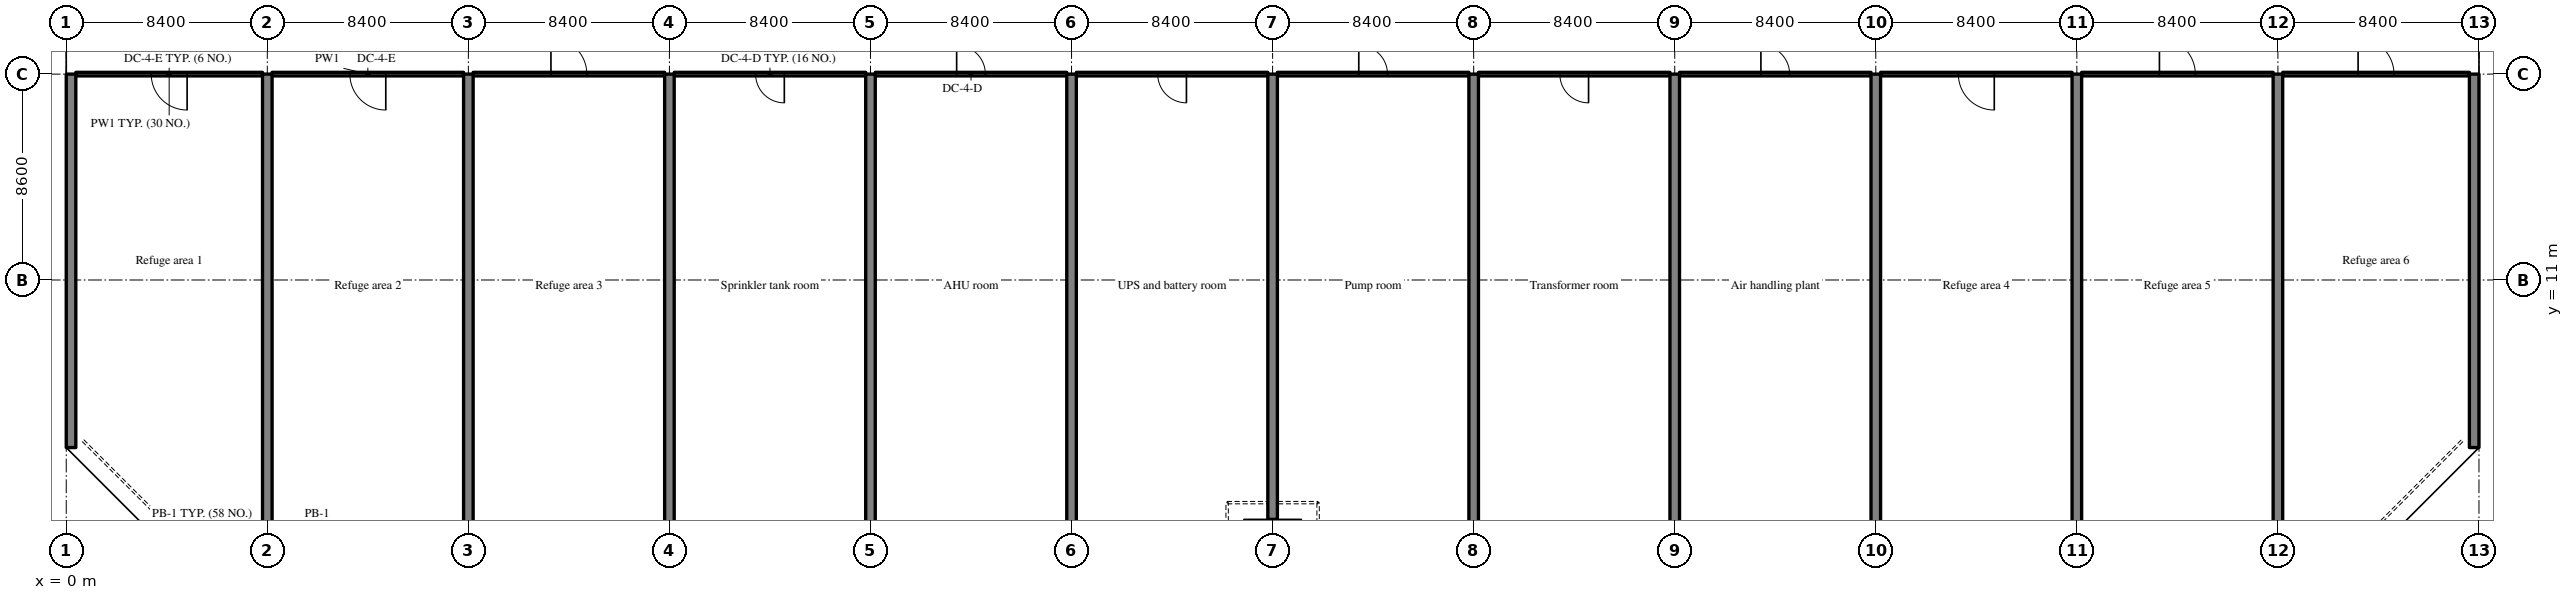
"""IFC4 building model, lengths in metres.
Left out: names, types, materials, properties, quantities, classifications, styles, units other than length and angle.
Written with IfcOpenShell. Run it as: python <this file> out.ifc"""

import sys

from ifc_helpers import new_model, si_unit, direction, frame, frame_2d, origin, place, context, subcontext, project, spatial, rectangle, extrude, source, transform, mapped, element, fill, save


model = new_model("IFC4")
c1 = context("Model", 3, precision=1e-05, world=origin(), true_north=direction((0.0, 1.0)))
c2 = subcontext(c1, "Body", "Model", "MODEL_VIEW")
j1 = project(units=[si_unit("LENGTHUNIT", "METRE"), si_unit("PLANEANGLEUNIT", "RADIAN")], contexts=[c1])
p1 = place(None, origin())
s1 = spatial("IfcSite", under=j1, at=p1, CompositionType="ELEMENT")
p2 = place(p1, origin())
s2 = spatial("IfcBuilding", under=s1, at=p2, CompositionType="ELEMENT")
p3 = place(p2, frame((0.0, 0.0, 81.0)))
s3 = spatial("IfcBuildingStorey", under=s2, at=p3, CompositionType="ELEMENT", Elevation=81.0)
m1 = source(origin(), c2, "Body", "SweptSolid", [
    extrude(rectangle(XDim=15.6, YDim=0.4, at=frame_2d((7.8, 0.0))), origin(), (0.0, 0.0, 1.0), 5.12),
])
p4 = place(p3, frame((0.2, 4.0, 0.0), z_axis=(0.0, 0.0, 1.0), x_axis=(0.0, 1.0, 0.0)))
e1 = element("IfcWall", 1, at=p4, inside=s3, PredefinedType="SHEAR", context=c2, shape_type="MappedRepresentation", body=[
    mapped(m1, transform((0.0, 0.0, 0.0), scale=1.0)),
])
m2 = source(origin(), c2, "Body", "SweptSolid", [
    extrude(rectangle(XDim=19.6, YDim=0.4, at=frame_2d((9.8, 0.0))), origin(), (0.0, 0.0, 1.0), 5.12),
])
for number, where, z_axis, x_axis in (
    (2, (8.4, 0.0, 0.0), (0.0, 0.0, 1.0), (0.0, 1.0, 0.0)),
    (3, (16.8, 0.0, 0.0), (0.0, 0.0, 1.0), (0.0, 1.0, 0.0)),
    (4, (25.2, 0.0, 0.0), (0.0, 0.0, 1.0), (0.0, 1.0, 0.0)),
    (5, (33.6, 0.0, 0.0), (0.0, 0.0, 1.0), (0.0, 1.0, 0.0)),
    (6, (42.0, 0.0, 0.0), (0.0, 0.0, 1.0), (0.0, 1.0, 0.0)),
):
    element("IfcWall", number, at=place(p3, frame(where, z_axis=z_axis, x_axis=x_axis)), inside=s3, PredefinedType="SHEAR", context=c2, shape_type="MappedRepresentation", body=[
        mapped(m2, transform((0.0, 0.0, 0.0), scale=1.0)),
    ])
m3 = source(origin(), c2, "Body", "SweptSolid", [
    extrude(rectangle(XDim=18.6, YDim=0.4, at=frame_2d((9.3, 0.0))), origin(), (0.0, 0.0, 1.0), 5.12),
])
p5 = place(p3, frame((50.4, 1.0, 0.0), z_axis=(0.0, 0.0, 1.0), x_axis=(0.0, 1.0, 0.0)))
e7 = element("IfcWall", 7, at=p5, inside=s3, PredefinedType="SHEAR", context=c2, shape_type="MappedRepresentation", body=[
    mapped(m3, transform((0.0, 0.0, 0.0), scale=1.0)),
])
for number, where, z_axis, x_axis in (
    (8, (58.8, 0.0, 0.0), (0.0, 0.0, 1.0), (0.0, 1.0, 0.0)),
    (9, (67.2, 0.0, 0.0), (0.0, 0.0, 1.0), (0.0, 1.0, 0.0)),
    (10, (75.6, 0.0, 0.0), (0.0, 0.0, 1.0), (0.0, 1.0, 0.0)),
    (11, (84.0, 0.0, 0.0), (0.0, 0.0, 1.0), (0.0, 1.0, 0.0)),
    (12, (92.4, 0.0, 0.0), (0.0, 0.0, 1.0), (0.0, 1.0, 0.0)),
):
    element("IfcWall", number, at=place(p3, frame(where, z_axis=z_axis, x_axis=x_axis)), inside=s3, PredefinedType="SHEAR", context=c2, shape_type="MappedRepresentation", body=[
        mapped(m2, transform((0.0, 0.0, 0.0), scale=1.0)),
    ])
p6 = place(p3, frame((100.6, 4.0, 0.0), z_axis=(0.0, 0.0, 1.0), x_axis=(0.0, 1.0, 0.0)))
e13 = element("IfcWall", 13, at=p6, inside=s3, PredefinedType="SHEAR", context=c2, shape_type="MappedRepresentation", body=[
    mapped(m1, transform((0.0, 0.0, 0.0), scale=1.0)),
])
m4 = source(origin(), c2, "Body", "SweptSolid", [
    extrude(rectangle(XDim=7.8, YDim=0.15, at=frame_2d((3.9, 0.0))), origin(), (0.0, 0.0, 1.0), 4.37),
])
p7 = place(p3, frame((0.4, 19.6, 0.0), z_axis=(0.0, 0.0, 1.0), x_axis=(1.0, 0.0, 0.0)))
e14 = element("IfcWall", 14, at=p7, inside=s3, PredefinedType="PARTITIONING", context=c2, shape_type="MappedRepresentation", body=[
    mapped(m4, transform((0.0, 0.0, 0.0), scale=1.0)),
])
m5 = source(origin(), c2, "Body", "SweptSolid", [
    extrude(rectangle(XDim=1.5, YDim=2.1, at=frame_2d((0.75, 1.05))), frame((0.0, 0.085, 0.0), z_axis=(0.0, -1.0, 0.0), x_axis=(1.0, 0.0, 0.0)), (0.0, 0.0, 1.0), 0.17),
])
p8 = place(p7, frame((3.15, 0.0, 0.0)))
e15 = element("IfcOpeningElement", 15, at=p8, cuts=e14, PredefinedType="OPENING", context=c2, shape_type="MappedRepresentation", body=[
    mapped(m5, transform((0.0, 0.0, 0.0), scale=1.0)),
])
m6 = source(origin(), c2, "Body", "SweptSolid", [
    extrude(rectangle(XDim=8.0, YDim=0.15, at=frame_2d((4.0, 0.0))), origin(), (0.0, 0.0, 1.0), 4.37),
])
p9 = place(p3, frame((8.6, 19.6, 0.0), z_axis=(0.0, 0.0, 1.0), x_axis=(1.0, 0.0, 0.0)))
e16 = element("IfcWall", 16, at=p9, inside=s3, PredefinedType="PARTITIONING", context=c2, shape_type="MappedRepresentation", body=[
    mapped(m6, transform((0.0, 0.0, 0.0), scale=1.0)),
])
p10 = place(p9, frame((3.25, 0.0, 0.0)))
e17 = element("IfcOpeningElement", 17, at=p10, cuts=e16, PredefinedType="OPENING", context=c2, shape_type="MappedRepresentation", body=[
    mapped(m5, transform((0.0, 0.0, 0.0), scale=1.0)),
])
p11 = place(p3, frame((17.0, 19.6, 0.0), z_axis=(0.0, 0.0, 1.0), x_axis=(1.0, 0.0, 0.0)))
e18 = element("IfcWall", 18, at=p11, inside=s3, PredefinedType="PARTITIONING", context=c2, shape_type="MappedRepresentation", body=[
    mapped(m6, transform((0.0, 0.0, 0.0), scale=1.0)),
])
p12 = place(p11, frame((3.25, 0.0, 0.0)))
e19 = element("IfcOpeningElement", 19, at=p12, cuts=e18, PredefinedType="OPENING", context=c2, shape_type="MappedRepresentation", body=[
    mapped(m5, transform((0.0, 0.0, 0.0), scale=1.0)),
])
p13 = place(p3, frame((25.4, 19.6, 0.0), z_axis=(0.0, 0.0, 1.0), x_axis=(1.0, 0.0, 0.0)))
e20 = element("IfcWall", 20, at=p13, inside=s3, PredefinedType="PARTITIONING", context=c2, shape_type="MappedRepresentation", body=[
    mapped(m6, transform((0.0, 0.0, 0.0), scale=1.0)),
])
m7 = source(origin(), c2, "Body", "SweptSolid", [
    extrude(rectangle(XDim=1.2, YDim=2.1, at=frame_2d((0.6, 1.05))), frame((0.0, 0.085, 0.0), z_axis=(0.0, -1.0, 0.0), x_axis=(1.0, 0.0, 0.0)), (0.0, 0.0, 1.0), 0.17),
])
p14 = place(p13, frame((3.4, 0.0, 0.0)))
e21 = element("IfcOpeningElement", 21, at=p14, cuts=e20, PredefinedType="OPENING", context=c2, shape_type="MappedRepresentation", body=[
    mapped(m7, transform((0.0, 0.0, 0.0), scale=1.0)),
])
p15 = place(p3, frame((33.8, 19.6, 0.0), z_axis=(0.0, 0.0, 1.0), x_axis=(1.0, 0.0, 0.0)))
e22 = element("IfcWall", 22, at=p15, inside=s3, PredefinedType="PARTITIONING", context=c2, shape_type="MappedRepresentation", body=[
    mapped(m6, transform((0.0, 0.0, 0.0), scale=1.0)),
])
p16 = place(p15, frame((3.4, 0.0, 0.0)))
e23 = element("IfcOpeningElement", 23, at=p16, cuts=e22, PredefinedType="OPENING", context=c2, shape_type="MappedRepresentation", body=[
    mapped(m7, transform((0.0, 0.0, 0.0), scale=1.0)),
])
p17 = place(p3, frame((42.2, 19.6, 0.0), z_axis=(0.0, 0.0, 1.0), x_axis=(1.0, 0.0, 0.0)))
e24 = element("IfcWall", 24, at=p17, inside=s3, PredefinedType="PARTITIONING", context=c2, shape_type="MappedRepresentation", body=[
    mapped(m6, transform((0.0, 0.0, 0.0), scale=1.0)),
])
p18 = place(p17, frame((3.4, 0.0, 0.0)))
e25 = element("IfcOpeningElement", 25, at=p18, cuts=e24, PredefinedType="OPENING", context=c2, shape_type="MappedRepresentation", body=[
    mapped(m7, transform((0.0, 0.0, 0.0), scale=1.0)),
])
p19 = place(p3, frame((50.6, 19.6, 0.0), z_axis=(0.0, 0.0, 1.0), x_axis=(1.0, 0.0, 0.0)))
e26 = element("IfcWall", 26, at=p19, inside=s3, PredefinedType="PARTITIONING", context=c2, shape_type="MappedRepresentation", body=[
    mapped(m6, transform((0.0, 0.0, 0.0), scale=1.0)),
])
p20 = place(p19, frame((3.4, 0.0, 0.0)))
e27 = element("IfcOpeningElement", 27, at=p20, cuts=e26, PredefinedType="OPENING", context=c2, shape_type="MappedRepresentation", body=[
    mapped(m7, transform((0.0, 0.0, 0.0), scale=1.0)),
])
p21 = place(p3, frame((59.0, 19.6, 0.0), z_axis=(0.0, 0.0, 1.0), x_axis=(1.0, 0.0, 0.0)))
e28 = element("IfcWall", 28, at=p21, inside=s3, PredefinedType="PARTITIONING", context=c2, shape_type="MappedRepresentation", body=[
    mapped(m6, transform((0.0, 0.0, 0.0), scale=1.0)),
])
p22 = place(p21, frame((3.4, 0.0, 0.0)))
e29 = element("IfcOpeningElement", 29, at=p22, cuts=e28, PredefinedType="OPENING", context=c2, shape_type="MappedRepresentation", body=[
    mapped(m7, transform((0.0, 0.0, 0.0), scale=1.0)),
])
p23 = place(p3, frame((67.4, 19.6, 0.0), z_axis=(0.0, 0.0, 1.0), x_axis=(1.0, 0.0, 0.0)))
e30 = element("IfcWall", 30, at=p23, inside=s3, PredefinedType="PARTITIONING", context=c2, shape_type="MappedRepresentation", body=[
    mapped(m6, transform((0.0, 0.0, 0.0), scale=1.0)),
])
p24 = place(p23, frame((3.4, 0.0, 0.0)))
e31 = element("IfcOpeningElement", 31, at=p24, cuts=e30, PredefinedType="OPENING", context=c2, shape_type="MappedRepresentation", body=[
    mapped(m7, transform((0.0, 0.0, 0.0), scale=1.0)),
])
p25 = place(p3, frame((75.8, 19.6, 0.0), z_axis=(0.0, 0.0, 1.0), x_axis=(1.0, 0.0, 0.0)))
e32 = element("IfcWall", 32, at=p25, inside=s3, PredefinedType="PARTITIONING", context=c2, shape_type="MappedRepresentation", body=[
    mapped(m6, transform((0.0, 0.0, 0.0), scale=1.0)),
])
p26 = place(p25, frame((3.25, 0.0, 0.0)))
e33 = element("IfcOpeningElement", 33, at=p26, cuts=e32, PredefinedType="OPENING", context=c2, shape_type="MappedRepresentation", body=[
    mapped(m5, transform((0.0, 0.0, 0.0), scale=1.0)),
])
p27 = place(p3, frame((84.2, 19.6, 0.0), z_axis=(0.0, 0.0, 1.0), x_axis=(1.0, 0.0, 0.0)))
e34 = element("IfcWall", 34, at=p27, inside=s3, PredefinedType="PARTITIONING", context=c2, shape_type="MappedRepresentation", body=[
    mapped(m6, transform((0.0, 0.0, 0.0), scale=1.0)),
])
p28 = place(p27, frame((3.25, 0.0, 0.0)))
e35 = element("IfcOpeningElement", 35, at=p28, cuts=e34, PredefinedType="OPENING", context=c2, shape_type="MappedRepresentation", body=[
    mapped(m5, transform((0.0, 0.0, 0.0), scale=1.0)),
])
m8 = source(origin(), c2, "Body", "SweptSolid", [
    extrude(rectangle(XDim=7.8, YDim=0.15, at=frame_2d((3.9, 0.0))), origin(), (0.0, 0.0, 1.0), 4.37),
])
p29 = place(p3, frame((92.6, 19.6, 0.0), z_axis=(0.0, 0.0, 1.0), x_axis=(1.0, 0.0, 0.0)))
e36 = element("IfcWall", 36, at=p29, inside=s3, PredefinedType="PARTITIONING", context=c2, shape_type="MappedRepresentation", body=[
    mapped(m8, transform((0.0, 0.0, 0.0), scale=1.0)),
])
p30 = place(p29, frame((3.15, 0.0, 0.0)))
e37 = element("IfcOpeningElement", 37, at=p30, cuts=e36, PredefinedType="OPENING", context=c2, shape_type="MappedRepresentation", body=[
    mapped(m5, transform((0.0, 0.0, 0.0), scale=1.0)),
])
m9 = source(origin(), c2, "Body", "SweptSolid", [
    extrude(rectangle(XDim=1.5, YDim=2.1, at=frame_2d((0.75, 1.05))), frame((0.0, 0.025, 0.0), z_axis=(0.0, -1.0, 0.0), x_axis=(1.0, 0.0, 0.0)), (0.0, 0.0, 1.0), 0.05),
])
p31 = place(p8, origin())
e38 = element("IfcDoor", 38, at=p31, inside=s3, OperationType="SINGLE_SWING_RIGHT", PredefinedType="DOOR", context=c2, shape_type="MappedRepresentation", body=[
    mapped(m9, transform((0.0, 0.0, 0.0), scale=1.0)),
])
fill(e15, e38)
p32 = place(p10, origin())
e39 = element("IfcDoor", 39, at=p32, inside=s3, OperationType="SINGLE_SWING_RIGHT", PredefinedType="DOOR", context=c2, shape_type="MappedRepresentation", body=[
    mapped(m9, transform((0.0, 0.0, 0.0), scale=1.0)),
])
fill(e17, e39)
p33 = place(p12, origin())
e40 = element("IfcDoor", 40, at=p33, inside=s3, OperationType="SINGLE_SWING_LEFT", PredefinedType="DOOR", context=c2, shape_type="MappedRepresentation", body=[
    mapped(m9, transform((0.0, 0.0, 0.0), scale=1.0)),
])
fill(e19, e40)
m10 = source(origin(), c2, "Body", "SweptSolid", [
    extrude(rectangle(XDim=1.2, YDim=2.1, at=frame_2d((0.6, 1.05))), frame((0.0, 0.025, 0.0), z_axis=(0.0, -1.0, 0.0), x_axis=(1.0, 0.0, 0.0)), (0.0, 0.0, 1.0), 0.05),
])
p34 = place(p14, origin())
e41 = element("IfcDoor", 41, at=p34, inside=s3, OperationType="SINGLE_SWING_RIGHT", PredefinedType="DOOR", context=c2, shape_type="MappedRepresentation", body=[
    mapped(m10, transform((0.0, 0.0, 0.0), scale=1.0)),
])
fill(e21, e41)
p35 = place(p16, origin())
e42 = element("IfcDoor", 42, at=p35, inside=s3, OperationType="SINGLE_SWING_LEFT", PredefinedType="DOOR", context=c2, shape_type="MappedRepresentation", body=[
    mapped(m10, transform((0.0, 0.0, 0.0), scale=1.0)),
])
fill(e23, e42)
p36 = place(p18, origin())
e43 = element("IfcDoor", 43, at=p36, inside=s3, OperationType="SINGLE_SWING_RIGHT", PredefinedType="DOOR", context=c2, shape_type="MappedRepresentation", body=[
    mapped(m10, transform((0.0, 0.0, 0.0), scale=1.0)),
])
fill(e25, e43)
p37 = place(p20, origin())
e44 = element("IfcDoor", 44, at=p37, inside=s3, OperationType="SINGLE_SWING_LEFT", PredefinedType="DOOR", context=c2, shape_type="MappedRepresentation", body=[
    mapped(m10, transform((0.0, 0.0, 0.0), scale=1.0)),
])
fill(e27, e44)
p38 = place(p22, origin())
e45 = element("IfcDoor", 45, at=p38, inside=s3, OperationType="SINGLE_SWING_RIGHT", PredefinedType="DOOR", context=c2, shape_type="MappedRepresentation", body=[
    mapped(m10, transform((0.0, 0.0, 0.0), scale=1.0)),
])
fill(e29, e45)
p39 = place(p24, origin())
e46 = element("IfcDoor", 46, at=p39, inside=s3, OperationType="SINGLE_SWING_LEFT", PredefinedType="DOOR", context=c2, shape_type="MappedRepresentation", body=[
    mapped(m10, transform((0.0, 0.0, 0.0), scale=1.0)),
])
fill(e31, e46)
p40 = place(p26, origin())
e47 = element("IfcDoor", 47, at=p40, inside=s3, OperationType="SINGLE_SWING_RIGHT", PredefinedType="DOOR", context=c2, shape_type="MappedRepresentation", body=[
    mapped(m9, transform((0.0, 0.0, 0.0), scale=1.0)),
])
fill(e33, e47)
p41 = place(p28, origin())
e48 = element("IfcDoor", 48, at=p41, inside=s3, OperationType="SINGLE_SWING_LEFT", PredefinedType="DOOR", context=c2, shape_type="MappedRepresentation", body=[
    mapped(m9, transform((0.0, 0.0, 0.0), scale=1.0)),
])
fill(e35, e48)
p42 = place(p30, origin())
e49 = element("IfcDoor", 49, at=p42, inside=s3, OperationType="SINGLE_SWING_LEFT", PredefinedType="DOOR", context=c2, shape_type="MappedRepresentation", body=[
    mapped(m9, transform((0.0, 0.0, 0.0), scale=1.0)),
])
fill(e37, e49)
save(model, sys.argv[1])
